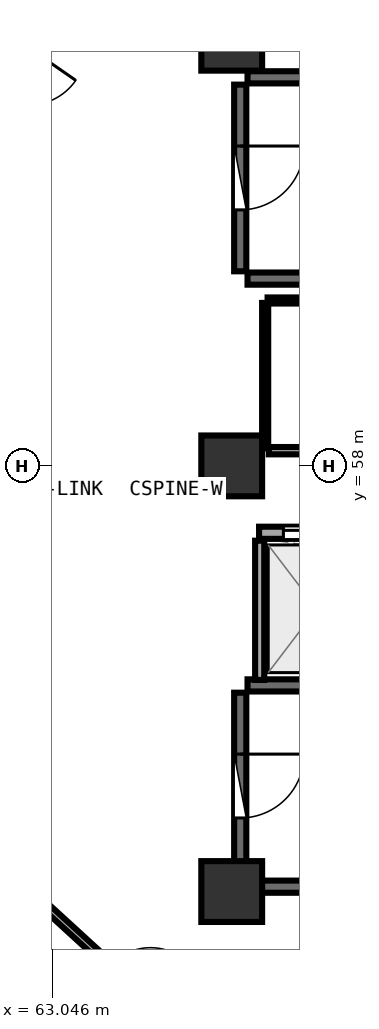
"""IFC4 building model, lengths in metres.
Left out: names, types, materials, properties, quantities, classifications, styles, units other than length and angle.
Written with IfcOpenShell. Run it as: python <this file> out.ifc"""

import sys

from ifc_helpers import new_model, si_unit, direction, frame, frame_2d, origin, origin_2d, place, context, subcontext, project, spatial, rectangle, extrude, element, fill, save


model = new_model("IFC4")
c1 = context("Model", 3, precision=1e-05, world=origin(), true_north=direction((0.0, 1.0)))
c2 = subcontext(c1, "Body", "Model", "MODEL_VIEW")
j1 = project(units=[si_unit("LENGTHUNIT", "METRE"), si_unit("PLANEANGLEUNIT", "RADIAN")], contexts=[c1])
p1 = place(None, origin())
s1 = spatial("IfcSite", under=j1, at=p1, CompositionType="ELEMENT")
p2 = place(p1, origin())
s2 = spatial("IfcBuilding", under=s1, at=p2, CompositionType="ELEMENT")
p3 = place(p2, frame((0.0, 0.0, 219.45)))
s3 = spatial("IfcBuildingStorey", under=s2, at=p3, CompositionType="ELEMENT", Elevation=219.45)
for number, where, z_axis, x_axis in (
    (1, (66.0, 51.0, 0.0), (0.0, 0.0, 1.0), (1.0, 0.0, 0.0)),
    (2, (66.0, 65.0, 0.0), (0.0, 0.0, 1.0), (1.0, 0.0, 0.0)),
    (3, (66.0, 58.0, 0.0), (0.0, 0.0, 1.0), (1.0, 0.0, 0.0)),
):
    element("IfcColumn", number, at=place(p3, frame(where, z_axis=z_axis, x_axis=x_axis)), inside=s3, PredefinedType="PILASTER", context=c2, shape_type="SweptSolid", body=[
        extrude(rectangle(XDim=1.0, YDim=1.0, at=origin_2d()), origin(), (0.0, 0.0, 1.0), 3.75),
    ])
for number, where, z_axis, x_axis in (
    (4, (66.26, 61.08, 0.0), (0.0, 0.0, 1.0), (1.0, 0.0, 0.0)),
    (5, (73.42, 64.39, 0.0), (0.0, 0.0, 1.0), (-1.0, 0.0, 0.0)),
):
    element("IfcWall", number, at=place(p3, frame(where, z_axis=z_axis, x_axis=x_axis)), inside=s3, PredefinedType="SHEAR", context=c2, shape_type="SweptSolid", body=[
        extrude(rectangle(XDim=7.16, YDim=0.2, at=frame_2d((3.58, 0.0))), origin(), (0.0, 0.0, 1.0), 3.49),
    ])
p4 = place(p3, frame((66.14, 64.27, 0.0), z_axis=(0.0, 0.0, 1.0), x_axis=(0.0, -1.0, 0.0)))
e6 = element("IfcWall", 6, at=p4, inside=s3, PredefinedType="SHEAR", context=c2, shape_type="SweptSolid", body=[
    extrude(rectangle(XDim=3.07, YDim=0.2, at=frame_2d((1.535, 0.0))), origin(), (0.0, 0.0, 1.0), 3.49),
])
p5 = place(p4, frame((1.01, 0.0, 0.0)))
e7 = element("IfcOpeningElement", 7, at=p5, cuts=e6, PredefinedType="OPENING", context=c2, shape_type="SweptSolid", body=[
    extrude(rectangle(XDim=1.05, YDim=2.1, at=frame_2d((0.525, 1.05))), frame((0.0, 0.11, 0.0), z_axis=(0.0, -1.0, 0.0), x_axis=(1.0, 0.0, 0.0)), (0.0, 0.0, 1.0), 0.22),
])
for number, where, z_axis, x_axis in (
    (8, (66.26, 51.08, 0.0), (0.0, 0.0, 1.0), (1.0, 0.0, 0.0)),
    (9, (73.42, 54.39, 0.0), (0.0, 0.0, 1.0), (-1.0, 0.0, 0.0)),
):
    element("IfcWall", number, at=place(p3, frame(where, z_axis=z_axis, x_axis=x_axis)), inside=s3, PredefinedType="SHEAR", context=c2, shape_type="SweptSolid", body=[
        extrude(rectangle(XDim=7.16, YDim=0.2, at=frame_2d((3.58, 0.0))), origin(), (0.0, 0.0, 1.0), 3.49),
    ])
p6 = place(p3, frame((66.14, 54.27, 0.0), z_axis=(0.0, 0.0, 1.0), x_axis=(0.0, -1.0, 0.0)))
e10 = element("IfcWall", 10, at=p6, inside=s3, PredefinedType="SHEAR", context=c2, shape_type="SweptSolid", body=[
    extrude(rectangle(XDim=3.07, YDim=0.2, at=frame_2d((1.535, 0.0))), origin(), (0.0, 0.0, 1.0), 3.49),
])
p7 = place(p6, frame((1.01, 0.0, 0.0)))
e11 = element("IfcOpeningElement", 11, at=p7, cuts=e10, PredefinedType="OPENING", context=c2, shape_type="SweptSolid", body=[
    extrude(rectangle(XDim=1.05, YDim=2.1, at=frame_2d((0.525, 1.05))), frame((0.0, 0.11, 0.0), z_axis=(0.0, -1.0, 0.0), x_axis=(1.0, 0.0, 0.0)), (0.0, 0.0, 1.0), 0.22),
])
p8 = place(p3, frame((66.45, 56.9, 0.0), z_axis=(0.0, 0.0, 1.0), x_axis=(1.0, 0.0, 0.0)))
e12 = element("IfcWall", 12, at=p8, inside=s3, PredefinedType="SOLIDWALL", context=c2, shape_type="SweptSolid", body=[
    extrude(rectangle(XDim=14.4, YDim=0.2, at=frame_2d((7.2, 0.0))), origin(), (0.0, 0.0, 1.0), 3.48),
])
p9 = place(p8, frame((0.4, 0.0, 0.0)))
e13 = element("IfcOpeningElement", 13, at=p9, cuts=e12, PredefinedType="OPENING", context=c2, shape_type="SweptSolid", body=[
    extrude(rectangle(XDim=1.1, YDim=2.1, at=frame_2d((0.55, 1.05))), frame((0.0, 0.11, 0.0), z_axis=(0.0, -1.0, 0.0), x_axis=(1.0, 0.0, 0.0)), (0.0, 0.0, 1.0), 0.22),
])
p10 = place(p8, frame((2.4, 0.0, 0.0)))
e14 = element("IfcOpeningElement", 14, at=p10, cuts=e12, PredefinedType="OPENING", context=c2, shape_type="SweptSolid", body=[
    extrude(rectangle(XDim=1.1, YDim=2.1, at=frame_2d((0.55, 1.05))), frame((0.0, 0.11, 0.0), z_axis=(0.0, -1.0, 0.0), x_axis=(1.0, 0.0, 0.0)), (0.0, 0.0, 1.0), 0.22),
])
p11 = place(p8, frame((4.4, 0.0, 0.0)))
e15 = element("IfcOpeningElement", 15, at=p11, cuts=e12, PredefinedType="OPENING", context=c2, shape_type="SweptSolid", body=[
    extrude(rectangle(XDim=1.1, YDim=2.1, at=frame_2d((0.55, 1.05))), frame((0.0, 0.11, 0.0), z_axis=(0.0, -1.0, 0.0), x_axis=(1.0, 0.0, 0.0)), (0.0, 0.0, 1.0), 0.22),
])
p12 = place(p3, frame((66.46, 54.48, 0.0), z_axis=(0.0, 0.0, 1.0), x_axis=(0.0, 1.0, 0.0)))
e16 = element("IfcWall", 16, at=p12, inside=s3, PredefinedType="PARTITIONING", context=c2, shape_type="SweptSolid", body=[
    extrude(rectangle(XDim=2.29, YDim=0.15, at=frame_2d((1.145, 0.0))), origin(), (0.0, 0.0, 1.0), 3.48),
])
p13 = place(p3, frame((66.61, 58.25, 0.0), z_axis=(0.0, 0.0, 1.0), x_axis=(1.0, 0.0, 0.0)))
e17 = element("IfcWall", 17, at=p13, inside=s3, PredefinedType="PARTITIONING", context=c2, shape_type="SweptSolid", body=[
    extrude(rectangle(XDim=5.78, YDim=0.12, at=frame_2d((2.89, 0.0))), origin(), (0.0, 0.0, 1.0), 3.48),
])
p14 = place(p13, frame((2.44, 0.0, 0.0)))
e18 = element("IfcOpeningElement", 18, at=p14, cuts=e17, PredefinedType="OPENING", context=c2, shape_type="SweptSolid", body=[
    extrude(rectangle(XDim=0.9, YDim=2.08, at=frame_2d((0.45, 1.04))), frame((0.0, 0.07, 0.0), z_axis=(0.0, -1.0, 0.0), x_axis=(1.0, 0.0, 0.0)), (0.0, 0.0, 1.0), 0.14),
])
p15 = place(p3, frame((62.803, 50.879, 0.0), z_axis=(0.0, 0.0, 1.0), x_axis=(0.737723633035, -0.675102837545, 0.0)))
e19 = element("IfcWall", 19, at=p15, inside=s3, PredefinedType="PARTITIONING", context=c2, shape_type="SweptSolid", body=[
    extrude(rectangle(XDim=4.144, YDim=0.12, at=frame_2d((2.072, 0.0))), origin(), (0.0, 0.0, 1.0), 3.025),
])
p16 = place(p15, frame((1.622, 0.0, 0.0)))
e20 = element("IfcOpeningElement", 20, at=p16, cuts=e19, PredefinedType="OPENING", context=c2, shape_type="SweptSolid", body=[
    extrude(rectangle(XDim=0.9, YDim=2.08, at=frame_2d((0.45, 1.04))), frame((0.0, 0.07, 0.0), z_axis=(0.0, -1.0, 0.0), x_axis=(1.0, 0.0, 0.0)), (0.0, 0.0, 1.0), 0.14),
])
p17 = place(p3, frame((72.41, 60.72, 0.0), z_axis=(0.0, 0.0, 1.0), x_axis=(-1.0, 0.0, 0.0)))
e21 = element("IfcWall", 21, at=p17, inside=s3, PredefinedType="PARTITIONING", context=c2, shape_type="SweptSolid", body=[
    extrude(rectangle(XDim=5.82, YDim=0.1, at=frame_2d((2.91, 0.0))), origin(), (0.0, 0.0, 1.0), 3.48),
])
p18 = place(p3, frame((66.55, 60.68, 0.0), z_axis=(0.0, 0.0, 1.0), x_axis=(0.0, -1.0, 0.0)))
e22 = element("IfcWall", 22, at=p18, inside=s3, PredefinedType="PARTITIONING", context=c2, shape_type="SweptSolid", body=[
    extrude(rectangle(XDim=2.39, YDim=0.1, at=frame_2d((1.195, 0.0))), origin(), (0.0, 0.0, 1.0), 3.48),
])
p19 = place(p5, origin())
e23 = element("IfcDoor", 23, at=p19, inside=s3, OperationType="SINGLE_SWING_LEFT", PredefinedType="DOOR", context=c2, shape_type="SweptSolid", body=[
    extrude(rectangle(XDim=1.05, YDim=2.1, at=frame_2d((0.525, 1.05))), frame((0.0, 0.025, 0.0), z_axis=(0.0, -1.0, 0.0), x_axis=(1.0, 0.0, 0.0)), (0.0, 0.0, 1.0), 0.05),
])
fill(e7, e23)
p20 = place(p7, origin())
e24 = element("IfcDoor", 24, at=p20, inside=s3, OperationType="SINGLE_SWING_LEFT", PredefinedType="DOOR", context=c2, shape_type="SweptSolid", body=[
    extrude(rectangle(XDim=1.05, YDim=2.1, at=frame_2d((0.525, 1.05))), frame((0.0, 0.025, 0.0), z_axis=(0.0, -1.0, 0.0), x_axis=(1.0, 0.0, 0.0)), (0.0, 0.0, 1.0), 0.05),
])
fill(e11, e24)
p21 = place(p9, origin())
e25 = element("IfcDoor", 25, at=p21, inside=s3, OperationType="DOUBLE_DOOR_SLIDING", PredefinedType="DOOR", context=c2, shape_type="SweptSolid", body=[
    extrude(rectangle(XDim=1.1, YDim=2.1, at=frame_2d((0.55, 1.05))), frame((0.0, 0.025, 0.0), z_axis=(0.0, -1.0, 0.0), x_axis=(1.0, 0.0, 0.0)), (0.0, 0.0, 1.0), 0.05),
])
fill(e13, e25)
save(model, sys.argv[1])
